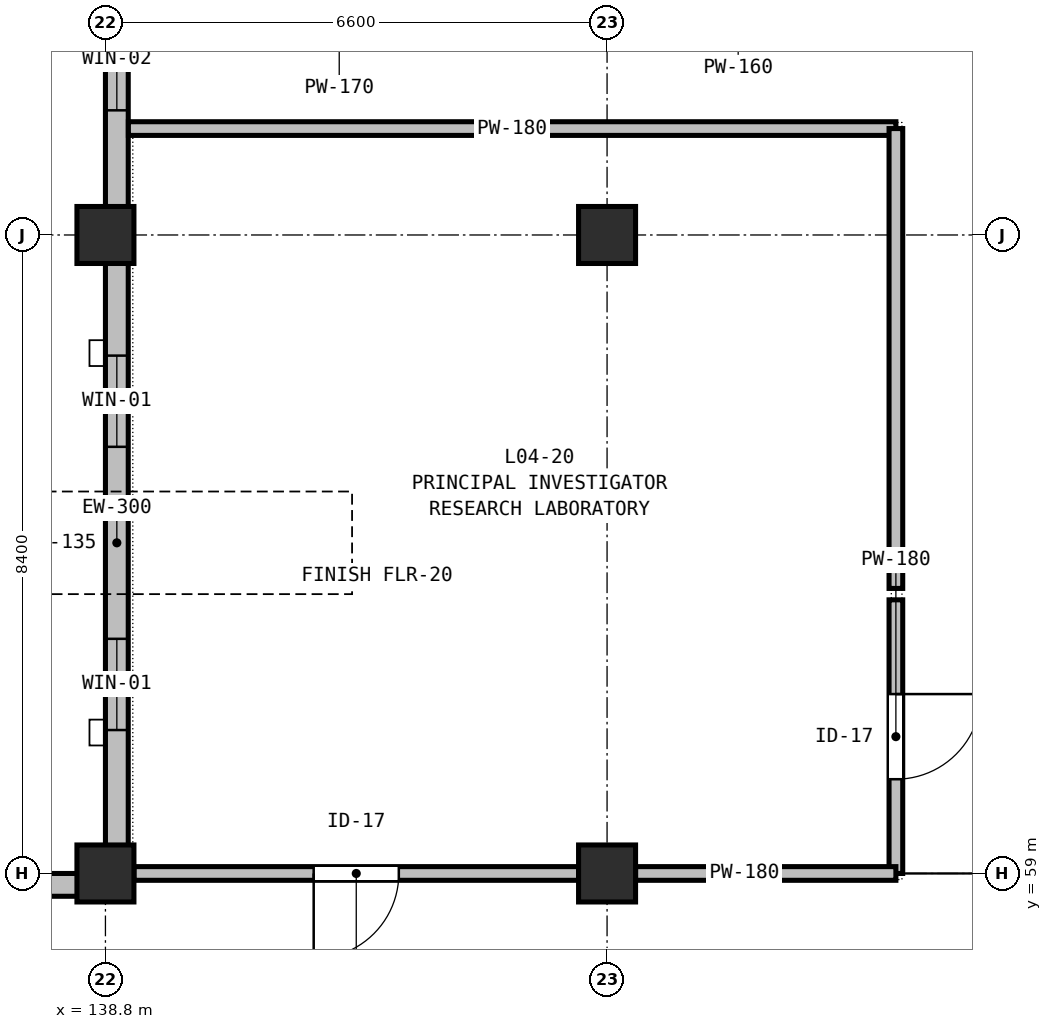
"""IFC4 building model, lengths in metres.
Left out: names, types, materials, properties, quantities, classifications, styles, units other than length and angle.
Written with IfcOpenShell. Run it as: python <this file> out.ifc"""

import sys

from ifc_helpers import new_model, si_unit, direction, frame, frame_2d, origin, origin_2d, place, context, subcontext, project, spatial, rectangle, extrude, element, fill, save


model = new_model("IFC4")
c1 = context("Model", 3, precision=1e-05, world=origin(), true_north=direction((0.0, 1.0)))
c2 = subcontext(c1, "Body", "Model", "MODEL_VIEW")
j1 = project(units=[si_unit("LENGTHUNIT", "METRE"), si_unit("PLANEANGLEUNIT", "RADIAN")], contexts=[c1])
p1 = place(None, origin())
s1 = spatial("IfcSite", under=j1, at=p1, CompositionType="ELEMENT")
p2 = place(p1, origin())
s2 = spatial("IfcBuilding", under=s1, at=p2, CompositionType="ELEMENT")
p3 = place(p2, frame((0.0, 0.0, 19.5)))
s3 = spatial("IfcBuildingStorey", under=s2, at=p3, CompositionType="ELEMENT", Elevation=19.5)
for number, where, z_axis, x_axis in (
    (1, (138.8, 59.0, 0.0), (0.0, 0.0, 1.0), (1.0, 0.0, 0.0)),
    (2, (138.8, 67.4, 0.0), (0.0, 0.0, 1.0), (1.0, 0.0, 0.0)),
    (3, (145.4, 59.0, 0.0), (0.0, 0.0, 1.0), (1.0, 0.0, 0.0)),
    (4, (145.4, 67.4, 0.0), (0.0, 0.0, 1.0), (1.0, 0.0, 0.0)),
):
    element("IfcColumn", number, at=place(p3, frame(where, z_axis=z_axis, x_axis=x_axis)), inside=s3, PredefinedType="COLUMN", context=c2, shape_type="SweptSolid", body=[
        extrude(rectangle(XDim=0.75, YDim=0.75, at=origin_2d()), origin(), (0.0, 0.0, 1.0), 4.5),
    ])
p4 = place(p3, frame((135.2, 58.85, 0.0), z_axis=(0.0, 0.0, 1.0), x_axis=(1.0, 0.0, 0.0)))
e5 = element("IfcWall", 5, at=p4, inside=s3, PredefinedType="STANDARD", context=c2, shape_type="SweptSolid", body=[
    extrude(rectangle(XDim=3.6, YDim=0.3, at=frame_2d((1.8, 0.0))), origin(), (0.0, 0.0, 1.0), 3.735),
])
p5 = place(p3, frame((138.95, 59.3, 0.0), z_axis=(0.0, 0.0, 1.0), x_axis=(0.0, 1.0, 0.0)))
e6 = element("IfcWall", 6, at=p5, inside=s3, PredefinedType="STANDARD", context=c2, shape_type="SweptSolid", body=[
    extrude(rectangle(XDim=8.1, YDim=0.3, at=frame_2d((4.05, 0.0))), origin(), (0.0, 0.0, 1.0), 3.885),
])
p6 = place(p5, frame((1.587, 0.0, 0.9)))
e7 = element("IfcOpeningElement", 7, at=p6, cuts=e6, PredefinedType="OPENING", context=c2, shape_type="SweptSolid", body=[
    extrude(rectangle(XDim=1.2, YDim=2.1, at=frame_2d((0.6, 1.05))), frame((0.0, 0.16, 0.0), z_axis=(0.0, -1.0, 0.0), x_axis=(1.0, 0.0, 0.0)), (0.0, 0.0, 1.0), 0.32),
])
p7 = place(p5, frame((5.313, 0.0, 0.9)))
e8 = element("IfcOpeningElement", 8, at=p7, cuts=e6, PredefinedType="OPENING", context=c2, shape_type="SweptSolid", body=[
    extrude(rectangle(XDim=1.2, YDim=2.1, at=frame_2d((0.6, 1.05))), frame((0.0, 0.16, 0.0), z_axis=(0.0, -1.0, 0.0), x_axis=(1.0, 0.0, 0.0)), (0.0, 0.0, 1.0), 0.32),
])
p8 = place(p3, frame((138.95, 67.4, 0.0), z_axis=(0.0, 0.0, 1.0), x_axis=(0.0, 1.0, 0.0)))
e9 = element("IfcWall", 9, at=p8, inside=s3, PredefinedType="STANDARD", context=c2, shape_type="SweptSolid", body=[
    extrude(rectangle(XDim=8.4, YDim=0.3, at=frame_2d((4.2, 0.0))), origin(), (0.0, 0.0, 1.0), 3.885),
])
p9 = place(p8, frame((1.64, 0.0, 0.9)))
e10 = element("IfcOpeningElement", 10, at=p9, cuts=e9, PredefinedType="OPENING", context=c2, shape_type="SweptSolid", body=[
    extrude(rectangle(XDim=1.35, YDim=2.1, at=frame_2d((0.675, 1.05))), frame((0.0, 0.16, 0.0), z_axis=(0.0, -1.0, 0.0), x_axis=(1.0, 0.0, 0.0)), (0.0, 0.0, 1.0), 0.32),
])
p10 = place(p8, frame((5.457, 0.0, 0.9)))
e11 = element("IfcOpeningElement", 11, at=p10, cuts=e9, PredefinedType="OPENING", context=c2, shape_type="SweptSolid", body=[
    extrude(rectangle(XDim=1.35, YDim=2.1, at=frame_2d((0.675, 1.05))), frame((0.0, 0.16, 0.0), z_axis=(0.0, -1.0, 0.0), x_axis=(1.0, 0.0, 0.0)), (0.0, 0.0, 1.0), 0.32),
])
p11 = place(p3, frame((149.2, 62.6, 0.0), z_axis=(0.0, 0.0, 1.0), x_axis=(0.0, -1.0, 0.0)))
e12 = element("IfcWall", 12, at=p11, inside=s3, PredefinedType="PARTITIONING", context=c2, shape_type="SweptSolid", body=[
    extrude(rectangle(XDim=3.6, YDim=0.18, at=frame_2d((1.8, 0.0))), origin(), (0.0, 0.0, 1.0), 3.885),
])
p12 = place(p11, frame((1.24, 0.0, 0.0)))
e13 = element("IfcOpeningElement", 13, at=p12, cuts=e12, PredefinedType="OPENING", context=c2, shape_type="SweptSolid", body=[
    extrude(rectangle(XDim=1.12, YDim=2.1, at=frame_2d((0.56, 1.05))), frame((0.0, 0.1, 0.0), z_axis=(0.0, -1.0, 0.0), x_axis=(1.0, 0.0, 0.0)), (0.0, 0.0, 1.0), 0.2),
])
p13 = place(p3, frame((149.2, 59.0, 0.0), z_axis=(0.0, 0.0, 1.0), x_axis=(-1.0, 0.0, 0.0)))
e14 = element("IfcWall", 14, at=p13, inside=s3, PredefinedType="PARTITIONING", context=c2, shape_type="SweptSolid", body=[
    extrude(rectangle(XDim=3.425, YDim=0.18, at=frame_2d((1.712, 0.0))), origin(), (0.0, 0.0, 1.0), 3.885),
])
p14 = place(p3, frame((145.025, 59.0, 0.0), z_axis=(0.0, 0.0, 1.0), x_axis=(-1.0, 0.0, 0.0)))
e15 = element("IfcWall", 15, at=p14, inside=s3, PredefinedType="PARTITIONING", context=c2, shape_type="SweptSolid", body=[
    extrude(rectangle(XDim=5.85, YDim=0.18, at=frame_2d((2.925, 0.0))), origin(), (0.0, 0.0, 1.0), 3.885),
])
p15 = place(p14, frame((2.365, 0.0, 0.0)))
e16 = element("IfcOpeningElement", 16, at=p15, cuts=e15, PredefinedType="OPENING", context=c2, shape_type="SweptSolid", body=[
    extrude(rectangle(XDim=1.12, YDim=2.1, at=frame_2d((0.56, 1.05))), frame((0.0, 0.1, 0.0), z_axis=(0.0, -1.0, 0.0), x_axis=(1.0, 0.0, 0.0)), (0.0, 0.0, 1.0), 0.2),
])
p16 = place(p3, frame((139.102, 68.8, 0.0), z_axis=(0.0, 0.0, 1.0), x_axis=(1.0, 0.0, 0.0)))
e17 = element("IfcWall", 17, at=p16, inside=s3, PredefinedType="PARTITIONING", context=c2, shape_type="SweptSolid", body=[
    extrude(rectangle(XDim=10.098, YDim=0.18, at=frame_2d((5.049, 0.0))), origin(), (0.0, 0.0, 1.0), 3.735),
])
p17 = place(p3, frame((149.2, 68.8, 0.0), z_axis=(0.0, 0.0, 1.0), x_axis=(0.0, -1.0, 0.0)))
e18 = element("IfcWall", 18, at=p17, inside=s3, PredefinedType="PARTITIONING", context=c2, shape_type="SweptSolid", body=[
    extrude(rectangle(XDim=6.05, YDim=0.18, at=frame_2d((3.025, 0.0))), origin(), (0.0, 0.0, 1.0), 3.885),
])
p18 = place(p6, origin())
e19 = element("IfcWindow", 19, at=p18, inside=s3, PartitioningType="SINGLE_PANEL", PredefinedType="WINDOW", context=c2, shape_type="SweptSolid", body=[
    extrude(rectangle(XDim=1.2, YDim=2.1, at=frame_2d((0.6, 1.05))), frame((0.0, 0.03, 0.0), z_axis=(0.0, -1.0, 0.0), x_axis=(1.0, 0.0, 0.0)), (0.0, 0.0, 1.0), 0.06),
])
fill(e7, e19)
p19 = place(p7, origin())
e20 = element("IfcWindow", 20, at=p19, inside=s3, PartitioningType="SINGLE_PANEL", PredefinedType="WINDOW", context=c2, shape_type="SweptSolid", body=[
    extrude(rectangle(XDim=1.2, YDim=2.1, at=frame_2d((0.6, 1.05))), frame((0.0, 0.03, 0.0), z_axis=(0.0, -1.0, 0.0), x_axis=(1.0, 0.0, 0.0)), (0.0, 0.0, 1.0), 0.06),
])
fill(e8, e20)
p20 = place(p9, origin())
e21 = element("IfcWindow", 21, at=p20, inside=s3, PartitioningType="SINGLE_PANEL", PredefinedType="WINDOW", context=c2, shape_type="SweptSolid", body=[
    extrude(rectangle(XDim=1.35, YDim=2.1, at=frame_2d((0.675, 1.05))), frame((0.0, 0.03, 0.0), z_axis=(0.0, -1.0, 0.0), x_axis=(1.0, 0.0, 0.0)), (0.0, 0.0, 1.0), 0.06),
])
fill(e10, e21)
p21 = place(p15, origin())
e22 = element("IfcDoor", 22, at=p21, inside=s3, OperationType="SINGLE_SWING_RIGHT", PredefinedType="DOOR", context=c2, shape_type="SweptSolid", body=[
    extrude(rectangle(XDim=1.12, YDim=2.1, at=frame_2d((0.56, 1.05))), frame((0.0, 0.025, 0.0), z_axis=(0.0, -1.0, 0.0), x_axis=(1.0, 0.0, 0.0)), (0.0, 0.0, 1.0), 0.05),
])
fill(e16, e22)
p22 = place(p12, origin())
e23 = element("IfcDoor", 23, at=p22, inside=s3, OperationType="SINGLE_SWING_LEFT", PredefinedType="DOOR", context=c2, shape_type="SweptSolid", body=[
    extrude(rectangle(XDim=1.12, YDim=2.1, at=frame_2d((0.56, 1.05))), frame((0.0, 0.025, 0.0), z_axis=(0.0, -1.0, 0.0), x_axis=(1.0, 0.0, 0.0)), (0.0, 0.0, 1.0), 0.05),
])
fill(e13, e23)
save(model, sys.argv[1])
